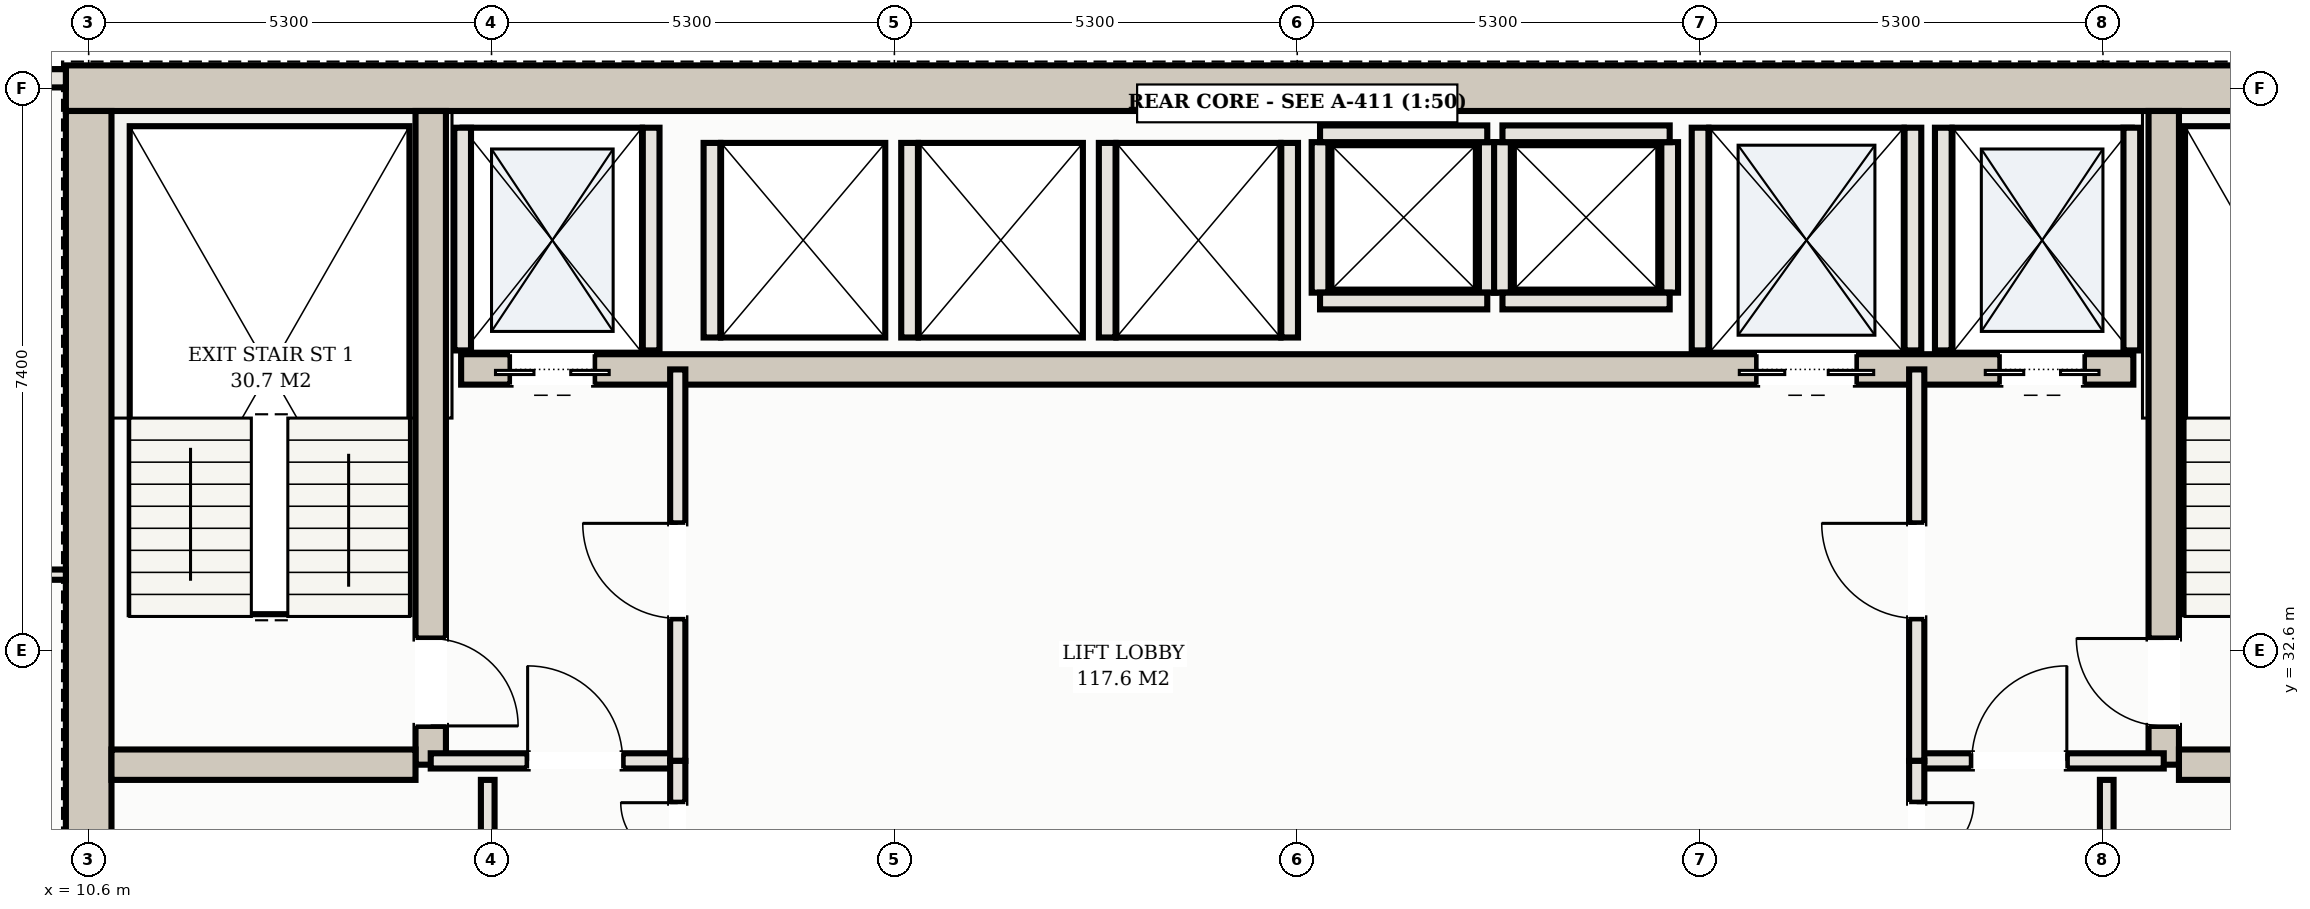
"""IFC4 building model, lengths in metres.
Left out: names, types, materials, properties, quantities, classifications, styles, units other than length and angle.
Written with IfcOpenShell. Run it as: python <this file> out.ifc"""

import sys

from ifc_helpers import new_model, si_unit, direction, frame, frame_2d, origin, place, context, subcontext, project, spatial, rectangle, extrude, element, fill, save


model = new_model("IFC4")
c1 = context("Model", 3, precision=1e-05, world=origin(), true_north=direction((0.0, 1.0)))
c2 = subcontext(c1, "Body", "Model", "MODEL_VIEW")
j1 = project(units=[si_unit("LENGTHUNIT", "METRE"), si_unit("PLANEANGLEUNIT", "RADIAN")], contexts=[c1])
p1 = place(None, origin())
s1 = spatial("IfcSite", under=j1, at=p1, CompositionType="ELEMENT")
p2 = place(p1, origin())
s2 = spatial("IfcBuilding", under=s1, at=p2, CompositionType="ELEMENT")
p3 = place(p2, frame((0.0, 0.0, 172.2)))
s3 = spatial("IfcBuildingStorey", under=s2, at=p3, CompositionType="ELEMENT", Elevation=172.2)
p4 = place(p3, frame((10.3, 40.0, 0.0), z_axis=(0.0, 0.0, 1.0), x_axis=(1.0, 0.0, 0.0)))
e1 = element("IfcWall", 1, at=p4, inside=s3, PredefinedType="SHEAR", context=c2, shape_type="SweptSolid", body=[
    extrude(rectangle(XDim=32.4, YDim=0.6, at=frame_2d((16.2, 0.0))), origin(), (0.0, 0.0, 1.0), 3.1),
])
p5 = place(p3, frame((10.6, 25.5, 0.0), z_axis=(0.0, 0.0, 1.0), x_axis=(0.0, 1.0, 0.0)))
e2 = element("IfcWall", 2, at=p5, inside=s3, PredefinedType="SHEAR", context=c2, shape_type="SweptSolid", body=[
    extrude(rectangle(XDim=14.2, YDim=0.6, at=frame_2d((7.1, 0.0))), origin(), (0.0, 0.0, 1.0), 3.1),
])
p6 = place(p3, frame((15.1, 31.1, 0.0), z_axis=(0.0, 0.0, 1.0), x_axis=(0.0, 1.0, 0.0)))
e3 = element("IfcWall", 3, at=p6, inside=s3, PredefinedType="SHEAR", context=c2, shape_type="SweptSolid", body=[
    extrude(rectangle(XDim=8.6, YDim=0.4, at=frame_2d((4.3, 0.0))), origin(), (0.0, 0.0, 1.0), 3.1),
])
p7 = place(p6, frame((0.51, 0.0, 0.0)))
e4 = element("IfcOpeningElement", 4, at=p7, cuts=e3, PredefinedType="OPENING", context=c2, shape_type="SweptSolid", body=[
    extrude(rectangle(XDim=1.15, YDim=2.2, at=frame_2d((0.575, 1.1))), frame((0.0, 0.21, 0.0), z_axis=(0.0, -1.0, 0.0), x_axis=(1.0, 0.0, 0.0)), (0.0, 0.0, 1.0), 0.42),
])
p8 = place(p3, frame((10.9, 31.1, 0.0), z_axis=(0.0, 0.0, 1.0), x_axis=(1.0, 0.0, 0.0)))
e5 = element("IfcWall", 5, at=p8, inside=s3, PredefinedType="SHEAR", context=c2, shape_type="SweptSolid", body=[
    extrude(rectangle(XDim=4.0, YDim=0.4, at=frame_2d((2.0, 0.0))), origin(), (0.0, 0.0, 1.0), 3.1),
])
p9 = place(p3, frame((37.9, 31.1, 0.0), z_axis=(0.0, 0.0, 1.0), x_axis=(0.0, 1.0, 0.0)))
e6 = element("IfcWall", 6, at=p9, inside=s3, PredefinedType="SHEAR", context=c2, shape_type="SweptSolid", body=[
    extrude(rectangle(XDim=8.6, YDim=0.4, at=frame_2d((4.3, 0.0))), origin(), (0.0, 0.0, 1.0), 3.1),
])
p10 = place(p9, frame((0.51, 0.0, 0.0)))
e7 = element("IfcOpeningElement", 7, at=p10, cuts=e6, PredefinedType="OPENING", context=c2, shape_type="SweptSolid", body=[
    extrude(rectangle(XDim=1.15, YDim=2.2, at=frame_2d((0.575, 1.1))), frame((0.0, 0.21, 0.0), z_axis=(0.0, -1.0, 0.0), x_axis=(1.0, 0.0, 0.0)), (0.0, 0.0, 1.0), 0.42),
])
p11 = place(p3, frame((38.1, 31.1, 0.0), z_axis=(0.0, 0.0, 1.0), x_axis=(1.0, 0.0, 0.0)))
e8 = element("IfcWall", 8, at=p11, inside=s3, PredefinedType="SHEAR", context=c2, shape_type="SweptSolid", body=[
    extrude(rectangle(XDim=4.0, YDim=0.4, at=frame_2d((2.0, 0.0))), origin(), (0.0, 0.0, 1.0), 3.1),
])
p12 = place(p3, frame((15.5, 36.3, 0.0), z_axis=(0.0, 0.0, 1.0), x_axis=(1.0, 0.0, 0.0)))
e9 = element("IfcWall", 9, at=p12, inside=s3, PredefinedType="SHEAR", context=c2, shape_type="SweptSolid", body=[
    extrude(rectangle(XDim=22.0, YDim=0.4, at=frame_2d((11.0, 0.0))), origin(), (0.0, 0.0, 1.0), 3.1),
])
p13 = place(p12, frame((0.65, 0.0, 0.0)))
e10 = element("IfcOpeningElement", 10, at=p13, cuts=e9, PredefinedType="OPENING", context=c2, shape_type="SweptSolid", body=[
    extrude(rectangle(XDim=1.1, YDim=2.15, at=frame_2d((0.55, 1.075))), frame((0.0, 0.21, 0.0), z_axis=(0.0, -1.0, 0.0), x_axis=(1.0, 0.0, 0.0)), (0.0, 0.0, 1.0), 0.42),
])
p14 = place(p12, frame((20.25, 0.0, 0.0)))
e11 = element("IfcOpeningElement", 11, at=p14, cuts=e9, PredefinedType="OPENING", context=c2, shape_type="SweptSolid", body=[
    extrude(rectangle(XDim=1.1, YDim=2.15, at=frame_2d((0.55, 1.075))), frame((0.0, 0.21, 0.0), z_axis=(0.0, -1.0, 0.0), x_axis=(1.0, 0.0, 0.0)), (0.0, 0.0, 1.0), 0.42),
])
p15 = place(p12, frame((17.05, 0.0, 0.0)))
e12 = element("IfcOpeningElement", 12, at=p15, cuts=e9, PredefinedType="OPENING", context=c2, shape_type="SweptSolid", body=[
    extrude(rectangle(XDim=1.3, YDim=2.2, at=frame_2d((0.65, 1.1))), frame((0.0, 0.21, 0.0), z_axis=(0.0, -1.0, 0.0), x_axis=(1.0, 0.0, 0.0)), (0.0, 0.0, 1.0), 0.42),
])
for number, where, z_axis, x_axis in (
    (13, (15.52, 36.55, 0.0), (0.0, 0.0, 1.0), (0.0, 1.0, 0.0)),
    (14, (18.0, 36.55, 0.0), (0.0, 0.0, 1.0), (0.0, 1.0, 0.0)),
    (15, (35.0, 36.55, 0.0), (0.0, 0.0, 1.0), (0.0, 1.0, 0.0)),
    (16, (37.48, 36.55, 0.0), (0.0, 0.0, 1.0), (0.0, 1.0, 0.0)),
    (17, (31.8, 36.55, 0.0), (0.0, 0.0, 1.0), (0.0, 1.0, 0.0)),
    (18, (34.6, 36.55, 0.0), (0.0, 0.0, 1.0), (0.0, 1.0, 0.0)),
):
    element("IfcWall", number, at=place(p3, frame(where, z_axis=z_axis, x_axis=x_axis)), inside=s3, PredefinedType="SOLIDWALL", context=c2, shape_type="SweptSolid", body=[
        extrude(rectangle(XDim=2.93, YDim=0.22, at=frame_2d((1.465, 0.0))), origin(), (0.0, 0.0, 1.0), 3.1),
    ])
for number, where, z_axis, x_axis in (
    (19, (18.8, 36.72, 0.0), (0.0, 0.0, 1.0), (0.0, 1.0, 0.0)),
    (20, (21.4, 36.72, 0.0), (0.0, 0.0, 1.0), (0.0, 1.0, 0.0)),
    (21, (24.0, 36.72, 0.0), (0.0, 0.0, 1.0), (0.0, 1.0, 0.0)),
    (22, (26.4, 36.72, 0.0), (0.0, 0.0, 1.0), (0.0, 1.0, 0.0)),
):
    element("IfcWall", number, at=place(p3, frame(where, z_axis=z_axis, x_axis=x_axis)), inside=s3, PredefinedType="SOLIDWALL", context=c2, shape_type="SweptSolid", body=[
        extrude(rectangle(XDim=2.56, YDim=0.22, at=frame_2d((1.28, 0.0))), origin(), (0.0, 0.0, 1.0), 3.1),
    ])
for number, where, z_axis, x_axis in (
    (23, (26.8, 37.31, 0.0), (0.0, 0.0, 1.0), (0.0, 1.0, 0.0)),
    (24, (29.0, 37.31, 0.0), (0.0, 0.0, 1.0), (0.0, 1.0, 0.0)),
):
    element("IfcWall", number, at=place(p3, frame(where, z_axis=z_axis, x_axis=x_axis)), inside=s3, PredefinedType="SOLIDWALL", context=c2, shape_type="SweptSolid", body=[
        extrude(rectangle(XDim=1.98, YDim=0.22, at=frame_2d((0.99, 0.0))), origin(), (0.0, 0.0, 1.0), 3.1),
    ])
for number, where, z_axis, x_axis in (
    (25, (26.8, 39.4, 0.0), (0.0, 0.0, 1.0), (1.0, 0.0, 0.0)),
    (26, (26.8, 37.2, 0.0), (0.0, 0.0, 1.0), (1.0, 0.0, 0.0)),
):
    element("IfcWall", number, at=place(p3, frame(where, z_axis=z_axis, x_axis=x_axis)), inside=s3, PredefinedType="SOLIDWALL", context=c2, shape_type="SweptSolid", body=[
        extrude(rectangle(XDim=2.2, YDim=0.22, at=frame_2d((1.1, 0.0))), origin(), (0.0, 0.0, 1.0), 3.1),
    ])
for number, where, z_axis, x_axis in (
    (27, (29.2, 37.31, 0.0), (0.0, 0.0, 1.0), (0.0, 1.0, 0.0)),
    (28, (31.4, 37.31, 0.0), (0.0, 0.0, 1.0), (0.0, 1.0, 0.0)),
):
    element("IfcWall", number, at=place(p3, frame(where, z_axis=z_axis, x_axis=x_axis)), inside=s3, PredefinedType="SOLIDWALL", context=c2, shape_type="SweptSolid", body=[
        extrude(rectangle(XDim=1.98, YDim=0.22, at=frame_2d((0.99, 0.0))), origin(), (0.0, 0.0, 1.0), 3.1),
    ])
for number, where, z_axis, x_axis in (
    (29, (29.2, 39.4, 0.0), (0.0, 0.0, 1.0), (1.0, 0.0, 0.0)),
    (30, (29.2, 37.2, 0.0), (0.0, 0.0, 1.0), (1.0, 0.0, 0.0)),
):
    element("IfcWall", number, at=place(p3, frame(where, z_axis=z_axis, x_axis=x_axis)), inside=s3, PredefinedType="SOLIDWALL", context=c2, shape_type="SweptSolid", body=[
        extrude(rectangle(XDim=2.2, YDim=0.22, at=frame_2d((1.1, 0.0))), origin(), (0.0, 0.0, 1.0), 3.1),
    ])
p16 = place(p3, frame((10.3, 40.13, 0.0), z_axis=(0.0, 0.0, 1.0), x_axis=(-1.0, 0.0, 0.0)))
e31 = element("IfcWall", 31, at=p16, inside=s3, PredefinedType="SOLIDWALL", context=c2, shape_type="SweptSolid", body=[
    extrude(rectangle(XDim=1.65, YDim=0.24, at=frame_2d((0.825, 0.0))), origin(), (0.0, 0.0, 1.0), 3.1),
])
p17 = place(p3, frame((15.1, 31.15, 0.0), z_axis=(0.0, 0.0, 1.0), x_axis=(1.0, 0.0, 0.0)))
e32 = element("IfcWall", 32, at=p17, inside=s3, PredefinedType="PARTITIONING", context=c2, shape_type="SweptSolid", body=[
    extrude(rectangle(XDim=3.25, YDim=0.2, at=frame_2d((1.625, 0.0))), origin(), (0.0, 0.0, 1.0), 2.38),
])
p18 = place(p17, frame((1.275, 0.0, 0.0)))
e33 = element("IfcOpeningElement", 33, at=p18, cuts=e32, PredefinedType="OPENING", context=c2, shape_type="SweptSolid", body=[
    extrude(rectangle(XDim=1.25, YDim=2.2, at=frame_2d((0.625, 1.1))), frame((0.0, 0.11, 0.0), z_axis=(0.0, -1.0, 0.0), x_axis=(1.0, 0.0, 0.0)), (0.0, 0.0, 1.0), 0.22),
])
p19 = place(p3, frame((18.35, 31.15, 0.0), z_axis=(0.0, 0.0, 1.0), x_axis=(0.0, 1.0, 0.0)))
e34 = element("IfcWall", 34, at=p19, inside=s3, PredefinedType="PARTITIONING", context=c2, shape_type="SweptSolid", body=[
    extrude(rectangle(XDim=5.15, YDim=0.2, at=frame_2d((2.575, 0.0))), origin(), (0.0, 0.0, 1.0), 2.38),
])
p20 = place(p19, frame((1.875, 0.0, 0.0)))
e35 = element("IfcOpeningElement", 35, at=p20, cuts=e34, PredefinedType="OPENING", context=c2, shape_type="SweptSolid", body=[
    extrude(rectangle(XDim=1.25, YDim=2.2, at=frame_2d((0.625, 1.1))), frame((0.0, 0.11, 0.0), z_axis=(0.0, -1.0, 0.0), x_axis=(1.0, 0.0, 0.0)), (0.0, 0.0, 1.0), 0.22),
])
p21 = place(p3, frame((34.65, 31.15, 0.0), z_axis=(0.0, 0.0, 1.0), x_axis=(1.0, 0.0, 0.0)))
e36 = element("IfcWall", 36, at=p21, inside=s3, PredefinedType="PARTITIONING", context=c2, shape_type="SweptSolid", body=[
    extrude(rectangle(XDim=3.25, YDim=0.2, at=frame_2d((1.625, 0.0))), origin(), (0.0, 0.0, 1.0), 2.38),
])
p22 = place(p21, frame((0.725, 0.0, 0.0)))
e37 = element("IfcOpeningElement", 37, at=p22, cuts=e36, PredefinedType="OPENING", context=c2, shape_type="SweptSolid", body=[
    extrude(rectangle(XDim=1.25, YDim=2.2, at=frame_2d((0.625, 1.1))), frame((0.0, 0.11, 0.0), z_axis=(0.0, -1.0, 0.0), x_axis=(1.0, 0.0, 0.0)), (0.0, 0.0, 1.0), 0.22),
])
p23 = place(p3, frame((34.65, 31.15, 0.0), z_axis=(0.0, 0.0, 1.0), x_axis=(0.0, 1.0, 0.0)))
e38 = element("IfcWall", 38, at=p23, inside=s3, PredefinedType="PARTITIONING", context=c2, shape_type="SweptSolid", body=[
    extrude(rectangle(XDim=5.15, YDim=0.2, at=frame_2d((2.575, 0.0))), origin(), (0.0, 0.0, 1.0), 2.38),
])
p24 = place(p23, frame((1.875, 0.0, 0.0)))
e39 = element("IfcOpeningElement", 39, at=p24, cuts=e38, PredefinedType="OPENING", context=c2, shape_type="SweptSolid", body=[
    extrude(rectangle(XDim=1.25, YDim=2.2, at=frame_2d((0.625, 1.1))), frame((0.0, 0.11, 0.0), z_axis=(0.0, -1.0, 0.0), x_axis=(1.0, 0.0, 0.0)), (0.0, 0.0, 1.0), 0.22),
])
p25 = place(p3, frame((15.85, 25.5, 0.0), z_axis=(0.0, 0.0, 1.0), x_axis=(0.0, 1.0, 0.0)))
e40 = element("IfcWall", 40, at=p25, inside=s3, PredefinedType="PARTITIONING", context=c2, shape_type="SweptSolid", body=[
    extrude(rectangle(XDim=5.4, YDim=0.18, at=frame_2d((2.7, 0.0))), origin(), (0.0, 0.0, 1.0), 2.38),
])
p26 = place(p25, frame((0.6, 0.0, 0.0)))
e41 = element("IfcOpeningElement", 41, at=p26, cuts=e40, PredefinedType="OPENING", context=c2, shape_type="SweptSolid", body=[
    extrude(rectangle(XDim=0.9, YDim=2.15, at=frame_2d((0.45, 1.075))), frame((0.0, 0.1, 0.0), z_axis=(0.0, -1.0, 0.0), x_axis=(1.0, 0.0, 0.0)), (0.0, 0.0, 1.0), 0.2),
])
p27 = place(p25, frame((3.265, 0.0, 0.0)))
e42 = element("IfcOpeningElement", 42, at=p27, cuts=e40, PredefinedType="OPENING", context=c2, shape_type="SweptSolid", body=[
    extrude(rectangle(XDim=0.92, YDim=2.15, at=frame_2d((0.46, 1.075))), frame((0.0, 0.1, 0.0), z_axis=(0.0, -1.0, 0.0), x_axis=(1.0, 0.0, 0.0)), (0.0, 0.0, 1.0), 0.2),
])
p28 = place(p3, frame((37.15, 25.5, 0.0), z_axis=(0.0, 0.0, 1.0), x_axis=(0.0, 1.0, 0.0)))
e43 = element("IfcWall", 43, at=p28, inside=s3, PredefinedType="PARTITIONING", context=c2, shape_type="SweptSolid", body=[
    extrude(rectangle(XDim=5.4, YDim=0.18, at=frame_2d((2.7, 0.0))), origin(), (0.0, 0.0, 1.0), 2.38),
])
p29 = place(p28, frame((2.24, 0.0, 0.0)))
e44 = element("IfcOpeningElement", 44, at=p29, cuts=e43, PredefinedType="OPENING", context=c2, shape_type="SweptSolid", body=[
    extrude(rectangle(XDim=0.92, YDim=2.15, at=frame_2d((0.46, 1.075))), frame((0.0, 0.1, 0.0), z_axis=(0.0, -1.0, 0.0), x_axis=(1.0, 0.0, 0.0)), (0.0, 0.0, 1.0), 0.2),
])
p30 = place(p3, frame((18.35, 28.55, 0.0), z_axis=(0.0, 0.0, 1.0), x_axis=(0.0, 1.0, 0.0)))
e45 = element("IfcWall", 45, at=p30, inside=s3, PredefinedType="PARTITIONING", context=c2, shape_type="SweptSolid", body=[
    extrude(rectangle(XDim=2.6, YDim=0.2, at=frame_2d((1.3, 0.0))), origin(), (0.0, 0.0, 1.0), 2.38),
])
p31 = place(p30, frame((0.55, 0.0, 0.0)))
e46 = element("IfcOpeningElement", 46, at=p31, cuts=e45, PredefinedType="OPENING", context=c2, shape_type="SweptSolid", body=[
    extrude(rectangle(XDim=1.5, YDim=2.25, at=frame_2d((0.75, 1.125))), frame((0.0, 0.11, 0.0), z_axis=(0.0, -1.0, 0.0), x_axis=(1.0, 0.0, 0.0)), (0.0, 0.0, 1.0), 0.22),
])
p32 = place(p3, frame((34.65, 28.55, 0.0), z_axis=(0.0, 0.0, 1.0), x_axis=(0.0, 1.0, 0.0)))
e47 = element("IfcWall", 47, at=p32, inside=s3, PredefinedType="PARTITIONING", context=c2, shape_type="SweptSolid", body=[
    extrude(rectangle(XDim=2.6, YDim=0.2, at=frame_2d((1.3, 0.0))), origin(), (0.0, 0.0, 1.0), 2.38),
])
p33 = place(p32, frame((0.55, 0.0, 0.0)))
e48 = element("IfcOpeningElement", 48, at=p33, cuts=e47, PredefinedType="OPENING", context=c2, shape_type="SweptSolid", body=[
    extrude(rectangle(XDim=1.5, YDim=2.25, at=frame_2d((0.75, 1.125))), frame((0.0, 0.11, 0.0), z_axis=(0.0, -1.0, 0.0), x_axis=(1.0, 0.0, 0.0)), (0.0, 0.0, 1.0), 0.22),
])
p34 = place(p3, frame((4.32, 33.6, 0.0), z_axis=(0.0, 0.0, 1.0), x_axis=(1.0, 0.0, 0.0)))
e49 = element("IfcWall", 49, at=p34, inside=s3, PredefinedType="PARTITIONING", context=c2, shape_type="SweptSolid", body=[
    extrude(rectangle(XDim=5.98, YDim=0.135, at=frame_2d((2.99, 0.0))), origin(), (0.0, 0.0, 1.0), 2.38),
])
p35 = place(p34, frame((2.53, 0.0, 0.0)))
e50 = element("IfcOpeningElement", 50, at=p35, cuts=e49, PredefinedType="OPENING", context=c2, shape_type="SweptSolid", body=[
    extrude(rectangle(XDim=0.92, YDim=2.15, at=frame_2d((0.46, 1.075))), frame((0.0, 0.078, 0.0), z_axis=(0.0, -1.0, 0.0), x_axis=(1.0, 0.0, 0.0)), (0.0, 0.0, 1.0), 0.155),
])
p36 = place(p13, frame((1.1, 0.0, 0.0), z_axis=(0.0, 0.0, 1.0), x_axis=(-1.0, 0.0, 0.0)))
e51 = element("IfcDoor", 51, at=p36, inside=s3, OperationType="DOUBLE_DOOR_SLIDING", PredefinedType="DOOR", context=c2, shape_type="SweptSolid", body=[
    extrude(rectangle(XDim=1.1, YDim=2.15, at=frame_2d((0.55, 1.075))), frame((0.0, 0.025, 0.0), z_axis=(0.0, -1.0, 0.0), x_axis=(1.0, 0.0, 0.0)), (0.0, 0.0, 1.0), 0.05),
])
fill(e10, e51)
p37 = place(p14, frame((1.1, 0.0, 0.0), z_axis=(0.0, 0.0, 1.0), x_axis=(-1.0, 0.0, 0.0)))
e52 = element("IfcDoor", 52, at=p37, inside=s3, OperationType="DOUBLE_DOOR_SLIDING", PredefinedType="DOOR", context=c2, shape_type="SweptSolid", body=[
    extrude(rectangle(XDim=1.1, YDim=2.15, at=frame_2d((0.55, 1.075))), frame((0.0, 0.025, 0.0), z_axis=(0.0, -1.0, 0.0), x_axis=(1.0, 0.0, 0.0)), (0.0, 0.0, 1.0), 0.05),
])
fill(e11, e52)
p38 = place(p15, frame((1.3, 0.0, 0.0), z_axis=(0.0, 0.0, 1.0), x_axis=(-1.0, 0.0, 0.0)))
e53 = element("IfcDoor", 53, at=p38, inside=s3, OperationType="DOUBLE_DOOR_SLIDING", PredefinedType="DOOR", context=c2, shape_type="SweptSolid", body=[
    extrude(rectangle(XDim=1.3, YDim=2.2, at=frame_2d((0.65, 1.1))), frame((0.0, 0.025, 0.0), z_axis=(0.0, -1.0, 0.0), x_axis=(1.0, 0.0, 0.0)), (0.0, 0.0, 1.0), 0.05),
])
fill(e12, e53)
p39 = place(p18, origin())
e54 = element("IfcDoor", 54, at=p39, inside=s3, OperationType="SINGLE_SWING_LEFT", PredefinedType="DOOR", context=c2, shape_type="SweptSolid", body=[
    extrude(rectangle(XDim=1.25, YDim=2.2, at=frame_2d((0.625, 1.1))), frame((0.0, 0.025, 0.0), z_axis=(0.0, -1.0, 0.0), x_axis=(1.0, 0.0, 0.0)), (0.0, 0.0, 1.0), 0.05),
])
fill(e33, e54)
p40 = place(p20, origin())
e55 = element("IfcDoor", 55, at=p40, inside=s3, OperationType="SINGLE_SWING_RIGHT", PredefinedType="DOOR", context=c2, shape_type="SweptSolid", body=[
    extrude(rectangle(XDim=1.25, YDim=2.2, at=frame_2d((0.625, 1.1))), frame((0.0, 0.025, 0.0), z_axis=(0.0, -1.0, 0.0), x_axis=(1.0, 0.0, 0.0)), (0.0, 0.0, 1.0), 0.05),
])
fill(e35, e55)
p41 = place(p22, origin())
e56 = element("IfcDoor", 56, at=p41, inside=s3, OperationType="SINGLE_SWING_RIGHT", PredefinedType="DOOR", context=c2, shape_type="SweptSolid", body=[
    extrude(rectangle(XDim=1.25, YDim=2.2, at=frame_2d((0.625, 1.1))), frame((0.0, 0.025, 0.0), z_axis=(0.0, -1.0, 0.0), x_axis=(1.0, 0.0, 0.0)), (0.0, 0.0, 1.0), 0.05),
])
fill(e37, e56)
p42 = place(p24, origin())
e57 = element("IfcDoor", 57, at=p42, inside=s3, OperationType="SINGLE_SWING_RIGHT", PredefinedType="DOOR", context=c2, shape_type="SweptSolid", body=[
    extrude(rectangle(XDim=1.25, YDim=2.2, at=frame_2d((0.625, 1.1))), frame((0.0, 0.025, 0.0), z_axis=(0.0, -1.0, 0.0), x_axis=(1.0, 0.0, 0.0)), (0.0, 0.0, 1.0), 0.05),
])
fill(e39, e57)
p43 = place(p7, frame((1.15, 0.0, 0.0), z_axis=(0.0, 0.0, 1.0), x_axis=(-1.0, 0.0, 0.0)))
e58 = element("IfcDoor", 58, at=p43, inside=s3, OperationType="SINGLE_SWING_RIGHT", PredefinedType="DOOR", context=c2, shape_type="SweptSolid", body=[
    extrude(rectangle(XDim=1.15, YDim=2.2, at=frame_2d((0.575, 1.1))), frame((0.0, 0.025, 0.0), z_axis=(0.0, -1.0, 0.0), x_axis=(1.0, 0.0, 0.0)), (0.0, 0.0, 1.0), 0.05),
])
fill(e4, e58)
p44 = place(p10, origin())
e59 = element("IfcDoor", 59, at=p44, inside=s3, OperationType="SINGLE_SWING_RIGHT", PredefinedType="DOOR", context=c2, shape_type="SweptSolid", body=[
    extrude(rectangle(XDim=1.15, YDim=2.2, at=frame_2d((0.575, 1.1))), frame((0.0, 0.025, 0.0), z_axis=(0.0, -1.0, 0.0), x_axis=(1.0, 0.0, 0.0)), (0.0, 0.0, 1.0), 0.05),
])
fill(e7, e59)
p45 = place(p31, origin())
e60 = element("IfcDoor", 60, at=p45, inside=s3, OperationType="DOUBLE_DOOR_SINGLE_SWING", PredefinedType="DOOR", context=c2, shape_type="SweptSolid", body=[
    extrude(rectangle(XDim=1.5, YDim=2.25, at=frame_2d((0.75, 1.125))), frame((0.0, 0.025, 0.0), z_axis=(0.0, -1.0, 0.0), x_axis=(1.0, 0.0, 0.0)), (0.0, 0.0, 1.0), 0.05),
])
fill(e46, e60)
p46 = place(p33, frame((1.5, 0.0, 0.0), z_axis=(0.0, 0.0, 1.0), x_axis=(-1.0, 0.0, 0.0)))
e61 = element("IfcDoor", 61, at=p46, inside=s3, OperationType="DOUBLE_DOOR_SINGLE_SWING", PredefinedType="DOOR", context=c2, shape_type="SweptSolid", body=[
    extrude(rectangle(XDim=1.5, YDim=2.25, at=frame_2d((0.75, 1.125))), frame((0.0, 0.025, 0.0), z_axis=(0.0, -1.0, 0.0), x_axis=(1.0, 0.0, 0.0)), (0.0, 0.0, 1.0), 0.05),
])
fill(e48, e61)
save(model, sys.argv[1])
